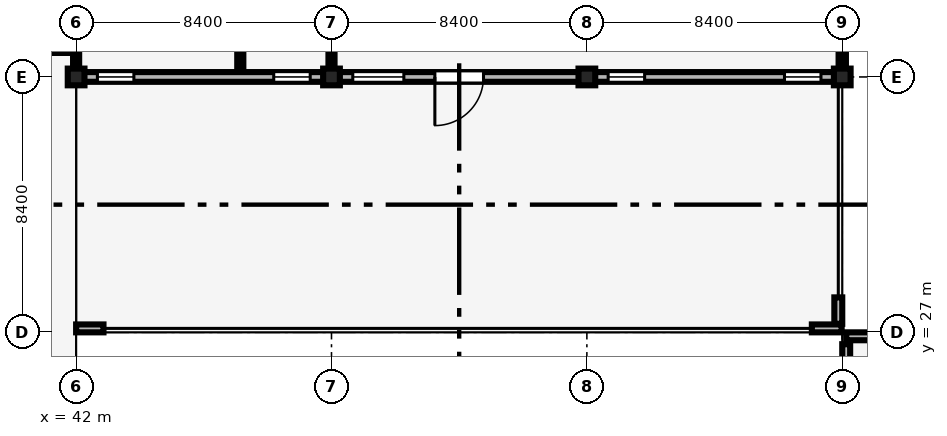
"""IFC4 building model, lengths in metres.
Left out: names, types, materials, properties, quantities, classifications, styles, units other than length and angle.
Written with IfcOpenShell. Run it as: python <this file> out.ifc"""

import sys

from ifc_helpers import new_model, si_unit, direction, frame, frame_2d, origin, origin_2d, place, context, subcontext, project, spatial, rectangle, extrude, element, fill, save


model = new_model("IFC4")
c1 = context("Model", 3, precision=1e-05, world=origin(), true_north=direction((0.0, 1.0)))
c2 = subcontext(c1, "Body", "Model", "MODEL_VIEW")
j1 = project(units=[si_unit("LENGTHUNIT", "METRE"), si_unit("PLANEANGLEUNIT", "RADIAN")], contexts=[c1])
p1 = place(None, origin())
s1 = spatial("IfcSite", under=j1, at=p1, CompositionType="ELEMENT")
p2 = place(p1, origin())
s2 = spatial("IfcBuilding", under=s1, at=p2, CompositionType="ELEMENT")
p3 = place(p2, frame((0.0, 0.0, 9.0)))
s3 = spatial("IfcBuildingStorey", under=s2, at=p3, CompositionType="ELEMENT", Elevation=9.0)
for number, where, z_axis, x_axis in (
    (1, (42.0, 35.4, 0.0), (0.0, 0.0, 1.0), (1.0, 0.0, 0.0)),
    (2, (50.4, 35.4, 0.0), (0.0, 0.0, 1.0), (1.0, 0.0, 0.0)),
    (3, (58.8, 35.4, 0.0), (0.0, 0.0, 1.0), (1.0, 0.0, 0.0)),
    (4, (67.2, 35.4, 0.0), (0.0, 0.0, 1.0), (1.0, 0.0, 0.0)),
):
    element("IfcColumn", number, at=place(p3, frame(where, z_axis=z_axis, x_axis=x_axis)), inside=s3, PredefinedType="COLUMN", context=c2, shape_type="SweptSolid", body=[
        extrude(rectangle(XDim=0.55, YDim=0.55, at=origin_2d()), origin(), (0.0, 0.0, 1.0), 4.2),
    ])
p4 = place(p3, frame((42.25, 35.4, 0.0), z_axis=(0.0, 0.0, 1.0), x_axis=(1.0, 0.0, 0.0)))
e5 = element("IfcWall", 5, at=p4, inside=s3, PredefinedType="SOLIDWALL", context=c2, shape_type="SweptSolid", body=[
    extrude(rectangle(XDim=7.9, YDim=0.32, at=frame_2d((3.95, 0.0))), origin(), (0.0, 0.0, 1.0), 2.96),
])
p5 = place(p4, frame((0.45, 0.0, 0.9)))
e6 = element("IfcOpeningElement", 6, at=p5, cuts=e5, PredefinedType="OPENING", context=c2, shape_type="SweptSolid", body=[
    extrude(rectangle(XDim=1.2, YDim=1.5, at=frame_2d((0.6, 0.75))), frame((0.0, 0.17, 0.0), z_axis=(0.0, -1.0, 0.0), x_axis=(1.0, 0.0, 0.0)), (0.0, 0.0, 1.0), 0.34),
])
p6 = place(p4, frame((6.25, 0.0, 0.9)))
e7 = element("IfcOpeningElement", 7, at=p6, cuts=e5, PredefinedType="OPENING", context=c2, shape_type="SweptSolid", body=[
    extrude(rectangle(XDim=1.2, YDim=1.8, at=frame_2d((0.6, 0.9))), frame((0.0, 0.17, 0.0), z_axis=(0.0, -1.0, 0.0), x_axis=(1.0, 0.0, 0.0)), (0.0, 0.0, 1.0), 0.34),
])
p7 = place(p3, frame((50.65, 35.4, 0.0), z_axis=(0.0, 0.0, 1.0), x_axis=(1.0, 0.0, 0.0)))
e8 = element("IfcWall", 8, at=p7, inside=s3, PredefinedType="SOLIDWALL", context=c2, shape_type="SweptSolid", body=[
    extrude(rectangle(XDim=7.9, YDim=0.32, at=frame_2d((3.95, 0.0))), origin(), (0.0, 0.0, 1.0), 2.91),
])
p8 = place(p7, frame((4.75, 0.0, 0.0), z_axis=(0.0, 0.0, 1.0), x_axis=(-1.0, 0.0, 0.0)))
e9 = element("IfcOpeningElement", 9, at=p8, cuts=e8, PredefinedType="OPENING", context=c2, shape_type="SweptSolid", body=[
    extrude(rectangle(XDim=1.6, YDim=2.3, at=frame_2d((0.8, 1.15))), frame((0.0, 0.17, 0.0), z_axis=(0.0, -1.0, 0.0), x_axis=(1.0, 0.0, 0.0)), (0.0, 0.0, 1.0), 0.34),
])
p9 = place(p7, frame((0.45, 0.0, 0.95)))
e10 = element("IfcOpeningElement", 10, at=p9, cuts=e8, PredefinedType="OPENING", context=c2, shape_type="SweptSolid", body=[
    extrude(rectangle(XDim=1.68, YDim=1.8, at=frame_2d((0.84, 0.9))), frame((0.0, 0.17, 0.0), z_axis=(0.0, -1.0, 0.0), x_axis=(1.0, 0.0, 0.0)), (0.0, 0.0, 1.0), 0.34),
])
p10 = place(p3, frame((59.05, 35.4, 0.0), z_axis=(0.0, 0.0, 1.0), x_axis=(1.0, 0.0, 0.0)))
e11 = element("IfcWall", 11, at=p10, inside=s3, PredefinedType="SOLIDWALL", context=c2, shape_type="SweptSolid", body=[
    extrude(rectangle(XDim=7.9, YDim=0.32, at=frame_2d((3.95, 0.0))), origin(), (0.0, 0.0, 1.0), 2.81),
])
p11 = place(p10, frame((0.45, 0.0, 0.9)))
e12 = element("IfcOpeningElement", 12, at=p11, cuts=e11, PredefinedType="OPENING", context=c2, shape_type="SweptSolid", body=[
    extrude(rectangle(XDim=1.2, YDim=1.5, at=frame_2d((0.6, 0.75))), frame((0.0, 0.17, 0.0), z_axis=(0.0, -1.0, 0.0), x_axis=(1.0, 0.0, 0.0)), (0.0, 0.0, 1.0), 0.34),
])
p12 = place(p10, frame((6.25, 0.0, 0.9)))
e13 = element("IfcOpeningElement", 13, at=p12, cuts=e11, PredefinedType="OPENING", context=c2, shape_type="SweptSolid", body=[
    extrude(rectangle(XDim=1.2, YDim=1.76, at=frame_2d((0.6, 0.88))), frame((0.0, 0.17, 0.0), z_axis=(0.0, -1.0, 0.0), x_axis=(1.0, 0.0, 0.0)), (0.0, 0.0, 1.0), 0.34),
])
p13 = place(p3, frame((67.2, 35.65, 0.0), z_axis=(0.0, 0.0, 1.0), x_axis=(0.0, 1.0, 0.0)))
e14 = element("IfcWall", 14, at=p13, inside=s3, PredefinedType="SOLIDWALL", context=c2, shape_type="SweptSolid", body=[
    extrude(rectangle(XDim=7.9, YDim=0.24, at=frame_2d((3.95, 0.0))), origin(), (0.0, 0.0, 1.0), 1.15),
])
p14 = place(p3, frame((67.33, 26.87, 0.0), z_axis=(0.0, 0.0, 1.0), x_axis=(1.0, 0.0, 0.0)))
e15 = element("IfcWall", 15, at=p14, inside=s3, PredefinedType="PARAPET", context=c2, shape_type="SweptSolid", body=[
    extrude(rectangle(XDim=24.94, YDim=0.26, at=frame_2d((12.47, 0.0))), origin(), (0.0, 0.0, 1.0), 0.85),
])
p15 = place(p3, frame((67.33, 18.39, 0.0), z_axis=(0.0, 0.0, 1.0), x_axis=(0.0, 1.0, 0.0)))
e16 = element("IfcWall", 16, at=p15, inside=s3, PredefinedType="PARAPET", context=c2, shape_type="SweptSolid", body=[
    extrude(rectangle(XDim=8.22, YDim=0.26, at=frame_2d((4.11, 0.0))), origin(), (0.0, 0.0, 1.0), 0.85),
])
p16 = place(p3, frame((42.0, 27.13, 0.0), z_axis=(0.0, 0.0, 1.0), x_axis=(1.0, 0.0, 0.0)))
e17 = element("IfcWall", 17, at=p16, inside=s3, PredefinedType="PARAPET", context=c2, shape_type="SweptSolid", body=[
    extrude(rectangle(XDim=0.9, YDim=0.26, at=frame_2d((0.45, 0.0))), origin(), (0.0, 0.0, 1.0), 1.12),
])
p17 = place(p3, frame((66.2, 27.13, 0.0), z_axis=(0.0, 0.0, 1.0), x_axis=(1.0, 0.0, 0.0)))
e18 = element("IfcWall", 18, at=p17, inside=s3, PredefinedType="PARAPET", context=c2, shape_type="SweptSolid", body=[
    extrude(rectangle(XDim=0.98, YDim=0.26, at=frame_2d((0.49, 0.0))), origin(), (0.0, 0.0, 1.0), 1.12),
])
p18 = place(p3, frame((67.07, 27.28, 0.0), z_axis=(0.0, 0.0, 1.0), x_axis=(0.0, 1.0, 0.0)))
e19 = element("IfcWall", 19, at=p18, inside=s3, PredefinedType="PARAPET", context=c2, shape_type="SweptSolid", body=[
    extrude(rectangle(XDim=0.87, YDim=0.26, at=frame_2d((0.435, 0.0))), origin(), (0.0, 0.0, 1.0), 1.12),
])
p19 = place(p3, frame((47.4, 35.565, 0.0), z_axis=(0.0, 0.0, 1.0), x_axis=(0.0, 1.0, 0.0)))
e20 = element("IfcWall", 20, at=p19, inside=s3, PredefinedType="PARTITIONING", context=c2, shape_type="SweptSolid", body=[
    extrude(rectangle(XDim=50.13, YDim=0.2, at=frame_2d((25.065, 0.0))), origin(), (0.0, 0.0, 1.0), 3.9),
])
p20 = place(p19, frame((4.135, 0.0, 0.0)))
e21 = element("IfcOpeningElement", 21, at=p20, cuts=e20, PredefinedType="OPENING", context=c2, shape_type="SweptSolid", body=[
    extrude(rectangle(XDim=1.0, YDim=2.15, at=frame_2d((0.5, 1.075))), frame((0.0, 0.11, 0.0), z_axis=(0.0, -1.0, 0.0), x_axis=(1.0, 0.0, 0.0)), (0.0, 0.0, 1.0), 0.22),
])
p21 = place(p19, frame((13.735, 0.0, 0.0)))
e22 = element("IfcOpeningElement", 22, at=p21, cuts=e20, PredefinedType="OPENING", context=c2, shape_type="SweptSolid", body=[
    extrude(rectangle(XDim=1.0, YDim=2.15, at=frame_2d((0.5, 1.075))), frame((0.0, 0.11, 0.0), z_axis=(0.0, -1.0, 0.0), x_axis=(1.0, 0.0, 0.0)), (0.0, 0.0, 1.0), 0.22),
])
p22 = place(p19, frame((21.36, 0.0, 0.0)))
e23 = element("IfcOpeningElement", 23, at=p22, cuts=e20, PredefinedType="OPENING", context=c2, shape_type="SweptSolid", body=[
    extrude(rectangle(XDim=0.95, YDim=2.2, at=frame_2d((0.475, 1.1))), frame((0.0, 0.11, 0.0), z_axis=(0.0, -1.0, 0.0), x_axis=(1.0, 0.0, 0.0)), (0.0, 0.0, 1.0), 0.22),
])
p23 = place(p19, frame((26.96, 0.0, 0.0)))
e24 = element("IfcOpeningElement", 24, at=p23, cuts=e20, PredefinedType="OPENING", context=c2, shape_type="SweptSolid", body=[
    extrude(rectangle(XDim=0.95, YDim=2.2, at=frame_2d((0.475, 1.1))), frame((0.0, 0.11, 0.0), z_axis=(0.0, -1.0, 0.0), x_axis=(1.0, 0.0, 0.0)), (0.0, 0.0, 1.0), 0.22),
])
p24 = place(p19, frame((32.56, 0.0, 0.0)))
e25 = element("IfcOpeningElement", 25, at=p24, cuts=e20, PredefinedType="OPENING", context=c2, shape_type="SweptSolid", body=[
    extrude(rectangle(XDim=0.95, YDim=2.1, at=frame_2d((0.475, 1.05))), frame((0.0, 0.11, 0.0), z_axis=(0.0, -1.0, 0.0), x_axis=(1.0, 0.0, 0.0)), (0.0, 0.0, 1.0), 0.22),
])
p25 = place(p19, frame((38.935, 0.0, 0.0)))
e26 = element("IfcOpeningElement", 26, at=p25, cuts=e20, PredefinedType="OPENING", context=c2, shape_type="SweptSolid", body=[
    extrude(rectangle(XDim=1.0, YDim=2.15, at=frame_2d((0.5, 1.075))), frame((0.0, 0.11, 0.0), z_axis=(0.0, -1.0, 0.0), x_axis=(1.0, 0.0, 0.0)), (0.0, 0.0, 1.0), 0.22),
])
p26 = place(p19, frame((46.135, 0.0, 0.0)))
e27 = element("IfcOpeningElement", 27, at=p26, cuts=e20, PredefinedType="OPENING", context=c2, shape_type="SweptSolid", body=[
    extrude(rectangle(XDim=1.0, YDim=2.15, at=frame_2d((0.5, 1.075))), frame((0.0, 0.11, 0.0), z_axis=(0.0, -1.0, 0.0), x_axis=(1.0, 0.0, 0.0)), (0.0, 0.0, 1.0), 0.22),
])
p27 = place(p3, frame((50.4, 35.565, 0.0), z_axis=(0.0, 0.0, 1.0), x_axis=(0.0, 1.0, 0.0)))
e28 = element("IfcWall", 28, at=p27, inside=s3, PredefinedType="PARTITIONING", context=c2, shape_type="SweptSolid", body=[
    extrude(rectangle(XDim=7.95, YDim=0.2, at=frame_2d((3.975, 0.0))), origin(), (0.0, 0.0, 1.0), 3.26),
])
p28 = place(p27, frame((3.535, 0.0, 0.0)))
e29 = element("IfcOpeningElement", 29, at=p28, cuts=e28, PredefinedType="OPENING", context=c2, shape_type="SweptSolid", body=[
    extrude(rectangle(XDim=1.0, YDim=2.15, at=frame_2d((0.5, 1.075))), frame((0.0, 0.11, 0.0), z_axis=(0.0, -1.0, 0.0), x_axis=(1.0, 0.0, 0.0)), (0.0, 0.0, 1.0), 0.22),
])
p29 = place(p5, origin())
e30 = element("IfcWindow", 30, at=p29, inside=s3, PartitioningType="SINGLE_PANEL", PredefinedType="WINDOW", context=c2, shape_type="SweptSolid", body=[
    extrude(rectangle(XDim=1.2, YDim=1.5, at=frame_2d((0.6, 0.75))), frame((0.0, 0.03, 0.0), z_axis=(0.0, -1.0, 0.0), x_axis=(1.0, 0.0, 0.0)), (0.0, 0.0, 1.0), 0.06),
])
fill(e6, e30)
p30 = place(p6, origin())
e31 = element("IfcWindow", 31, at=p30, inside=s3, PartitioningType="SINGLE_PANEL", PredefinedType="WINDOW", context=c2, shape_type="SweptSolid", body=[
    extrude(rectangle(XDim=1.2, YDim=1.8, at=frame_2d((0.6, 0.9))), frame((0.0, 0.03, 0.0), z_axis=(0.0, -1.0, 0.0), x_axis=(1.0, 0.0, 0.0)), (0.0, 0.0, 1.0), 0.06),
])
fill(e7, e31)
p31 = place(p8, origin())
e32 = element("IfcDoor", 32, at=p31, inside=s3, OperationType="DOUBLE_DOOR_SINGLE_SWING", PredefinedType="DOOR", context=c2, shape_type="SweptSolid", body=[
    extrude(rectangle(XDim=1.6, YDim=2.3, at=frame_2d((0.8, 1.15))), frame((0.0, 0.025, 0.0), z_axis=(0.0, -1.0, 0.0), x_axis=(1.0, 0.0, 0.0)), (0.0, 0.0, 1.0), 0.05),
])
fill(e9, e32)
p32 = place(p9, origin())
e33 = element("IfcWindow", 33, at=p32, inside=s3, PartitioningType="SINGLE_PANEL", PredefinedType="WINDOW", context=c2, shape_type="SweptSolid", body=[
    extrude(rectangle(XDim=1.68, YDim=1.8, at=frame_2d((0.84, 0.9))), frame((0.0, 0.03, 0.0), z_axis=(0.0, -1.0, 0.0), x_axis=(1.0, 0.0, 0.0)), (0.0, 0.0, 1.0), 0.06),
])
fill(e10, e33)
p33 = place(p11, origin())
e34 = element("IfcWindow", 34, at=p33, inside=s3, PartitioningType="SINGLE_PANEL", PredefinedType="WINDOW", context=c2, shape_type="SweptSolid", body=[
    extrude(rectangle(XDim=1.2, YDim=1.5, at=frame_2d((0.6, 0.75))), frame((0.0, 0.03, 0.0), z_axis=(0.0, -1.0, 0.0), x_axis=(1.0, 0.0, 0.0)), (0.0, 0.0, 1.0), 0.06),
])
fill(e12, e34)
p34 = place(p12, origin())
e35 = element("IfcWindow", 35, at=p34, inside=s3, PartitioningType="SINGLE_PANEL", PredefinedType="WINDOW", context=c2, shape_type="SweptSolid", body=[
    extrude(rectangle(XDim=1.2, YDim=1.76, at=frame_2d((0.6, 0.88))), frame((0.0, 0.03, 0.0), z_axis=(0.0, -1.0, 0.0), x_axis=(1.0, 0.0, 0.0)), (0.0, 0.0, 1.0), 0.06),
])
fill(e13, e35)
save(model, sys.argv[1])
